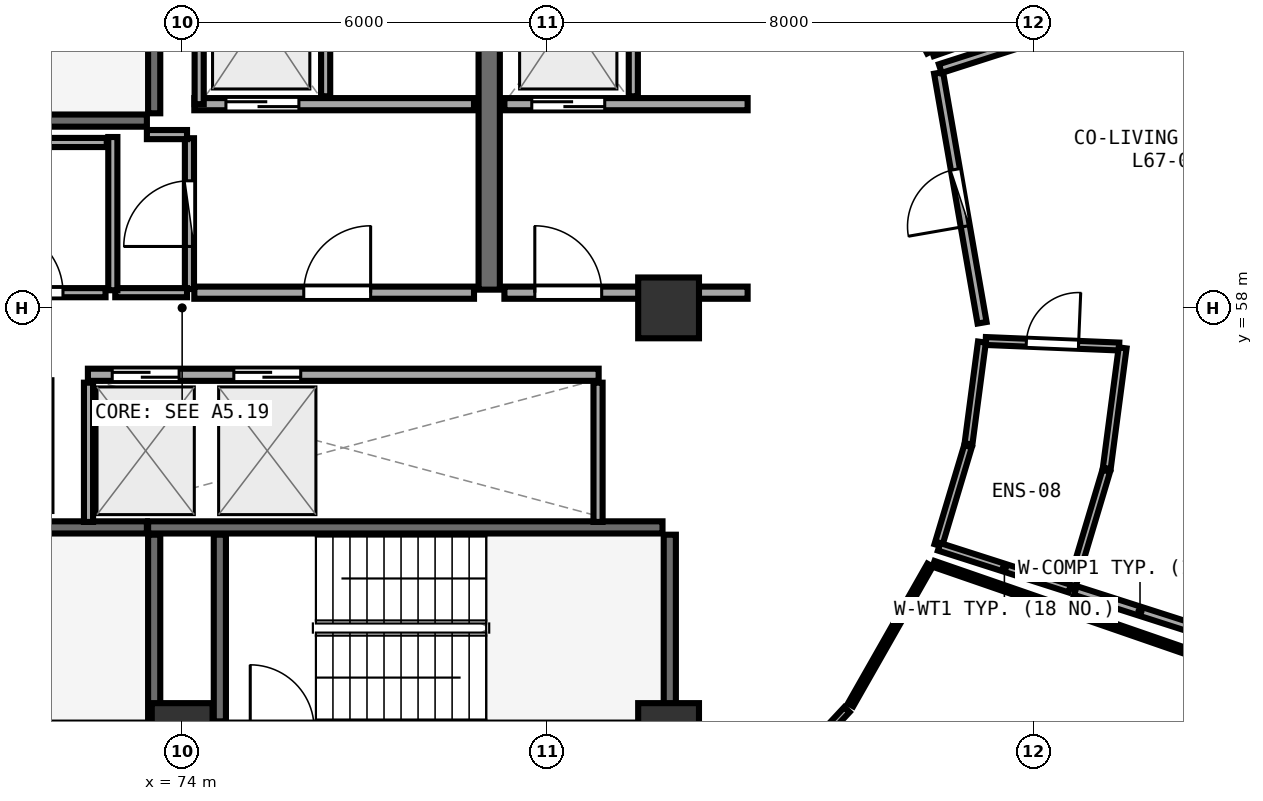
"""IFC4 building model, lengths in metres.
Left out: names, types, materials, properties, quantities, classifications, styles, units other than length and angle.
Written with IfcOpenShell. Run it as: python <this file> out.ifc"""

import sys

from ifc_helpers import new_model, si_unit, direction, frame, frame_2d, origin, origin_2d, place, context, subcontext, project, spatial, rectangle, extrude, element, fill, save


model = new_model("IFC4")
c1 = context("Model", 3, precision=1e-05, world=origin(), true_north=direction((0.0, 1.0)))
c2 = subcontext(c1, "Body", "Model", "MODEL_VIEW")
j1 = project(units=[si_unit("LENGTHUNIT", "METRE"), si_unit("PLANEANGLEUNIT", "RADIAN")], contexts=[c1])
p1 = place(None, origin())
s1 = spatial("IfcSite", under=j1, at=p1, CompositionType="ELEMENT")
p2 = place(p1, origin())
s2 = spatial("IfcBuilding", under=s1, at=p2, CompositionType="ELEMENT")
p3 = place(p2, frame((0.0, 0.0, 263.7)))
s3 = spatial("IfcBuildingStorey", under=s2, at=p3, CompositionType="ELEMENT", Elevation=263.7)
for number, where, z_axis, x_axis in (
    (1, (74.0, 51.0, 0.0), (0.0, 0.0, 1.0), (1.0, 0.0, 0.0)),
    (2, (82.0, 51.0, 0.0), (0.0, 0.0, 1.0), (1.0, 0.0, 0.0)),
    (3, (82.0, 58.0, 0.0), (0.0, 0.0, 1.0), (1.0, 0.0, 0.0)),
):
    element("IfcColumn", number, at=place(p3, frame(where, z_axis=z_axis, x_axis=x_axis)), inside=s3, PredefinedType="PILASTER", context=c2, shape_type="SweptSolid", body=[
        extrude(rectangle(XDim=1.0, YDim=1.0, at=origin_2d()), origin(), (0.0, 0.0, 1.0), 3.75),
    ])
p4 = place(p3, frame((66.26, 61.08, 0.0), z_axis=(0.0, 0.0, 1.0), x_axis=(1.0, 0.0, 0.0)))
e4 = element("IfcWall", 4, at=p4, inside=s3, PredefinedType="SHEAR", context=c2, shape_type="SweptSolid", body=[
    extrude(rectangle(XDim=7.16, YDim=0.2, at=frame_2d((3.58, 0.0))), origin(), (0.0, 0.0, 1.0), 3.49),
])
for number, where, z_axis, x_axis in (
    (5, (73.54, 61.2, 0.0), (0.0, 0.0, 1.0), (0.0, 1.0, 0.0)),
    (6, (82.02, 51.2, 0.0), (0.0, 0.0, 1.0), (0.0, 1.0, 0.0)),
):
    element("IfcWall", number, at=place(p3, frame(where, z_axis=z_axis, x_axis=x_axis)), inside=s3, PredefinedType="SHEAR", context=c2, shape_type="SweptSolid", body=[
        extrude(rectangle(XDim=3.07, YDim=0.2, at=frame_2d((1.535, 0.0))), origin(), (0.0, 0.0, 1.0), 3.49),
    ])
p5 = place(p3, frame((81.9, 54.39, 0.0), z_axis=(0.0, 0.0, 1.0), x_axis=(-1.0, 0.0, 0.0)))
e7 = element("IfcWall", 7, at=p5, inside=s3, PredefinedType="SHEAR", context=c2, shape_type="SweptSolid", body=[
    extrude(rectangle(XDim=8.46, YDim=0.2, at=frame_2d((4.23, 0.0))), origin(), (0.0, 0.0, 1.0), 3.49),
])
for number, where, z_axis, x_axis in (
    (8, (74.62, 54.27, 0.0), (0.0, 0.0, 1.0), (0.0, -1.0, 0.0)),
    (9, (73.54, 51.2, 0.0), (0.0, 0.0, 1.0), (0.0, 1.0, 0.0)),
):
    element("IfcWall", number, at=place(p3, frame(where, z_axis=z_axis, x_axis=x_axis)), inside=s3, PredefinedType="SHEAR", context=c2, shape_type="SweptSolid", body=[
        extrude(rectangle(XDim=3.07, YDim=0.2, at=frame_2d((1.535, 0.0))), origin(), (0.0, 0.0, 1.0), 3.49),
    ])
p6 = place(p3, frame((73.42, 54.39, 0.0), z_axis=(0.0, 0.0, 1.0), x_axis=(-1.0, 0.0, 0.0)))
e10 = element("IfcWall", 10, at=p6, inside=s3, PredefinedType="SHEAR", context=c2, shape_type="SweptSolid", body=[
    extrude(rectangle(XDim=7.16, YDim=0.2, at=frame_2d((3.58, 0.0))), origin(), (0.0, 0.0, 1.0), 3.49),
])
p7 = place(p3, frame((79.05, 58.3, 0.0), z_axis=(0.0, 0.0, 1.0), x_axis=(0.0, 1.0, 0.0)))
e11 = element("IfcWall", 11, at=p7, inside=s3, PredefinedType="SHEAR", context=c2, shape_type="SweptSolid", body=[
    extrude(rectangle(XDim=6.3, YDim=0.35, at=frame_2d((3.15, 0.0))), origin(), (0.0, 0.0, 1.0), 3.49),
])
p8 = place(p3, frame((74.2, 61.35, 0.0), z_axis=(0.0, 0.0, 1.0), x_axis=(1.0, 0.0, 0.0)))
e12 = element("IfcWall", 12, at=p8, inside=s3, PredefinedType="SOLIDWALL", context=c2, shape_type="SweptSolid", body=[
    extrude(rectangle(XDim=4.6, YDim=0.2, at=frame_2d((2.3, 0.0))), origin(), (0.0, 0.0, 1.0), 3.48),
])
p9 = place(p8, frame((0.52, 0.0, 0.0)))
e13 = element("IfcOpeningElement", 13, at=p9, cuts=e12, PredefinedType="OPENING", context=c2, shape_type="SweptSolid", body=[
    extrude(rectangle(XDim=1.2, YDim=2.15, at=frame_2d((0.6, 1.075))), frame((0.0, 0.11, 0.0), z_axis=(0.0, -1.0, 0.0), x_axis=(1.0, 0.0, 0.0)), (0.0, 0.0, 1.0), 0.22),
])
p10 = place(p3, frame((74.28, 61.35, 0.0), z_axis=(0.0, 0.0, 1.0), x_axis=(0.0, 1.0, 0.0)))
e14 = element("IfcWall", 14, at=p10, inside=s3, PredefinedType="PARTITIONING", context=c2, shape_type="SweptSolid", body=[
    extrude(rectangle(XDim=2.97, YDim=0.15, at=frame_2d((1.485, 0.0))), origin(), (0.0, 0.0, 1.0), 3.48),
])
p11 = place(p3, frame((76.36, 61.48, 0.0), z_axis=(0.0, 0.0, 1.0), x_axis=(0.0, 1.0, 0.0)))
e15 = element("IfcWall", 15, at=p11, inside=s3, PredefinedType="PARTITIONING", context=c2, shape_type="SweptSolid", body=[
    extrude(rectangle(XDim=2.84, YDim=0.15, at=frame_2d((1.42, 0.0))), origin(), (0.0, 0.0, 1.0), 3.48),
])
p12 = place(p3, frame((79.3, 61.35, 0.0), z_axis=(0.0, 0.0, 1.0), x_axis=(1.0, 0.0, 0.0)))
e16 = element("IfcWall", 16, at=p12, inside=s3, PredefinedType="SOLIDWALL", context=c2, shape_type="SweptSolid", body=[
    extrude(rectangle(XDim=4.0, YDim=0.2, at=frame_2d((2.0, 0.0))), origin(), (0.0, 0.0, 1.0), 2.775),
])
p13 = place(p12, frame((0.45, 0.0, 0.0)))
e17 = element("IfcOpeningElement", 17, at=p13, cuts=e16, PredefinedType="OPENING", context=c2, shape_type="SweptSolid", body=[
    extrude(rectangle(XDim=1.2, YDim=2.15, at=frame_2d((0.6, 1.075))), frame((0.0, 0.11, 0.0), z_axis=(0.0, -1.0, 0.0), x_axis=(1.0, 0.0, 0.0)), (0.0, 0.0, 1.0), 0.22),
])
p14 = place(p3, frame((81.42, 61.48, 0.0), z_axis=(0.0, 0.0, 1.0), x_axis=(0.0, 1.0, 0.0)))
e18 = element("IfcWall", 18, at=p14, inside=s3, PredefinedType="PARTITIONING", context=c2, shape_type="SweptSolid", body=[
    extrude(rectangle(XDim=2.84, YDim=0.15, at=frame_2d((1.42, 0.0))), origin(), (0.0, 0.0, 1.0), 3.48),
])
p15 = place(p3, frame((74.2, 58.25, 0.0), z_axis=(0.0, 0.0, 1.0), x_axis=(1.0, 0.0, 0.0)))
e19 = element("IfcWall", 19, at=p15, inside=s3, PredefinedType="SOLIDWALL", context=c2, shape_type="SweptSolid", body=[
    extrude(rectangle(XDim=4.6, YDim=0.2, at=frame_2d((2.3, 0.0))), origin(), (0.0, 0.0, 1.0), 3.48),
])
p16 = place(p15, frame((1.8, 0.0, 0.0)))
e20 = element("IfcOpeningElement", 20, at=p16, cuts=e19, PredefinedType="OPENING", context=c2, shape_type="SweptSolid", body=[
    extrude(rectangle(XDim=1.1, YDim=2.1, at=frame_2d((0.55, 1.05))), frame((0.0, 0.11, 0.0), z_axis=(0.0, -1.0, 0.0), x_axis=(1.0, 0.0, 0.0)), (0.0, 0.0, 1.0), 0.22),
])
p17 = place(p3, frame((79.3, 58.25, 0.0), z_axis=(0.0, 0.0, 1.0), x_axis=(1.0, 0.0, 0.0)))
e21 = element("IfcWall", 21, at=p17, inside=s3, PredefinedType="SOLIDWALL", context=c2, shape_type="SweptSolid", body=[
    extrude(rectangle(XDim=4.0, YDim=0.2, at=frame_2d((2.0, 0.0))), origin(), (0.0, 0.0, 1.0), 2.775),
])
p18 = place(p17, frame((0.5, 0.0, 0.0)))
e22 = element("IfcOpeningElement", 22, at=p18, cuts=e21, PredefinedType="OPENING", context=c2, shape_type="SweptSolid", body=[
    extrude(rectangle(XDim=1.1, YDim=2.1, at=frame_2d((0.55, 1.05))), frame((0.0, 0.11, 0.0), z_axis=(0.0, -1.0, 0.0), x_axis=(1.0, 0.0, 0.0)), (0.0, 0.0, 1.0), 0.22),
])
p19 = place(p3, frame((72.45, 56.9, 0.0), z_axis=(0.0, 0.0, 1.0), x_axis=(1.0, 0.0, 0.0)))
e23 = element("IfcWall", 23, at=p19, inside=s3, PredefinedType="SOLIDWALL", context=c2, shape_type="SweptSolid", body=[
    extrude(rectangle(XDim=8.4, YDim=0.2, at=frame_2d((4.2, 0.0))), origin(), (0.0, 0.0, 1.0), 3.48),
])
p20 = place(p19, frame((0.4, 0.0, 0.0)))
e24 = element("IfcOpeningElement", 24, at=p20, cuts=e23, PredefinedType="OPENING", context=c2, shape_type="SweptSolid", body=[
    extrude(rectangle(XDim=1.1, YDim=2.1, at=frame_2d((0.55, 1.05))), frame((0.0, 0.11, 0.0), z_axis=(0.0, -1.0, 0.0), x_axis=(1.0, 0.0, 0.0)), (0.0, 0.0, 1.0), 0.22),
])
p21 = place(p19, frame((2.4, 0.0, 0.0)))
e25 = element("IfcOpeningElement", 25, at=p21, cuts=e23, PredefinedType="OPENING", context=c2, shape_type="SweptSolid", body=[
    extrude(rectangle(XDim=1.1, YDim=2.1, at=frame_2d((0.55, 1.05))), frame((0.0, 0.11, 0.0), z_axis=(0.0, -1.0, 0.0), x_axis=(1.0, 0.0, 0.0)), (0.0, 0.0, 1.0), 0.22),
])
for number, where, z_axis, x_axis in (
    (26, (72.46, 54.48, 0.0), (0.0, 0.0, 1.0), (0.0, 1.0, 0.0)),
    (27, (80.84, 54.48, 0.0), (0.0, 0.0, 1.0), (0.0, 1.0, 0.0)),
):
    element("IfcWall", number, at=place(p3, frame(where, z_axis=z_axis, x_axis=x_axis)), inside=s3, PredefinedType="PARTITIONING", context=c2, shape_type="SweptSolid", body=[
        extrude(rectangle(XDim=2.29, YDim=0.15, at=frame_2d((1.145, 0.0))), origin(), (0.0, 0.0, 1.0), 3.48),
    ])
p22 = place(p3, frame((74.12, 58.31, 0.0), z_axis=(0.0, 0.0, 1.0), x_axis=(0.0, 1.0, 0.0)))
e28 = element("IfcWall", 28, at=p22, inside=s3, PredefinedType="PARTITIONING", context=c2, shape_type="SweptSolid", body=[
    extrude(rectangle(XDim=2.48, YDim=0.15, at=frame_2d((1.24, 0.0))), origin(), (0.0, 0.0, 1.0), 3.48),
])
p23 = place(p22, frame((0.7, 0.0, 0.0)))
e29 = element("IfcOpeningElement", 29, at=p23, cuts=e28, PredefinedType="OPENING", context=c2, shape_type="SweptSolid", body=[
    extrude(rectangle(XDim=1.08, YDim=2.1, at=frame_2d((0.54, 1.05))), frame((0.0, 0.085, 0.0), z_axis=(0.0, -1.0, 0.0), x_axis=(1.0, 0.0, 0.0)), (0.0, 0.0, 1.0), 0.17),
])
p24 = place(p3, frame((70.26, 58.25, 0.0), z_axis=(0.0, 0.0, 1.0), x_axis=(1.0, 0.0, 0.0)))
e30 = element("IfcWall", 30, at=p24, inside=s3, PredefinedType="PARTITIONING", context=c2, shape_type="SweptSolid", body=[
    extrude(rectangle(XDim=2.48, YDim=0.15, at=frame_2d((1.24, 0.0))), origin(), (0.0, 0.0, 1.0), 3.48),
])
p25 = place(p24, frame((0.7, 0.0, 0.0)))
e31 = element("IfcOpeningElement", 31, at=p25, cuts=e30, PredefinedType="OPENING", context=c2, shape_type="SweptSolid", body=[
    extrude(rectangle(XDim=1.08, YDim=2.1, at=frame_2d((0.54, 1.05))), frame((0.0, 0.085, 0.0), z_axis=(0.0, -1.0, 0.0), x_axis=(1.0, 0.0, 0.0)), (0.0, 0.0, 1.0), 0.17),
])
p26 = place(p3, frame((83.118, 49.443, 0.0), z_axis=(0.0, 0.0, 1.0), x_axis=(0.681315269885, 0.731990097625, 0.0)))
e32 = element("IfcWall", 32, at=p26, inside=s3, PredefinedType="PARTITIONING", context=c2, shape_type="SweptSolid", body=[
    extrude(rectangle(XDim=2.664, YDim=0.12, at=frame_2d((1.332, 0.0))), origin(), (0.0, 0.0, 1.0), 3.075),
])
p27 = place(p26, frame((0.882, 0.0, 0.0)))
e33 = element("IfcOpeningElement", 33, at=p27, cuts=e32, PredefinedType="OPENING", context=c2, shape_type="SweptSolid", body=[
    extrude(rectangle(XDim=0.9, YDim=2.08, at=frame_2d((0.45, 1.04))), frame((0.0, 0.07, 0.0), z_axis=(0.0, -1.0, 0.0), x_axis=(1.0, 0.0, 0.0)), (0.0, 0.0, 1.0), 0.14),
])
p28 = place(p3, frame((87.216, 57.456, 0.0), z_axis=(0.0, 0.0, 1.0), x_axis=(0.999139994921, -0.041464087462, 0.0)))
e34 = element("IfcWall", 34, at=p28, inside=s3, PredefinedType="PLUMBINGWALL", context=c2, shape_type="SweptSolid", body=[
    extrude(rectangle(XDim=2.196, YDim=0.13, at=frame_2d((1.098, 0.0))), origin(), (0.0, 0.0, 1.0), 3.175),
])
p29 = place(p28, frame((0.668, 0.0, 0.0)))
e35 = element("IfcOpeningElement", 35, at=p29, cuts=e34, PredefinedType="OPENING", context=c2, shape_type="SweptSolid", body=[
    extrude(rectangle(XDim=0.86, YDim=2.05, at=frame_2d((0.43, 1.025))), frame((0.0, 0.075, 0.0), z_axis=(0.0, -1.0, 0.0), x_axis=(1.0, 0.0, 0.0)), (0.0, 0.0, 1.0), 0.15),
])
p30 = place(p3, frame((87.156, 57.755, 0.0), z_axis=(0.0, 0.0, 1.0), x_axis=(-0.171570913007, 0.985171772743, 0.0)))
e36 = element("IfcWall", 36, at=p30, inside=s3, PredefinedType="PARTITIONING", context=c2, shape_type="SweptSolid", body=[
    extrude(rectangle(XDim=4.171, YDim=0.15, at=frame_2d((2.085, 0.0))), origin(), (0.0, 0.0, 1.0), 3.075),
])
p31 = place(p30, frame((1.61, 0.0, 0.0)))
e37 = element("IfcOpeningElement", 37, at=p31, cuts=e36, PredefinedType="OPENING", context=c2, shape_type="SweptSolid", body=[
    extrude(rectangle(XDim=0.95, YDim=2.08, at=frame_2d((0.475, 1.04))), frame((0.0, 0.085, 0.0), z_axis=(0.0, -1.0, 0.0), x_axis=(1.0, 0.0, 0.0)), (0.0, 0.0, 1.0), 0.17),
])
p32 = place(p3, frame((72.9, 58.25, 0.0), z_axis=(0.0, 0.0, 1.0), x_axis=(1.0, 0.0, 0.0)))
e38 = element("IfcWall", 38, at=p32, inside=s3, PredefinedType="PARTITIONING", context=c2, shape_type="SweptSolid", body=[
    extrude(rectangle(XDim=1.18, YDim=0.15, at=frame_2d((0.59, 0.0))), origin(), (0.0, 0.0, 1.0), 3.48),
])
p33 = place(p3, frame((74.08, 60.85, 0.0), z_axis=(0.0, 0.0, 1.0), x_axis=(-1.0, 0.0, 0.0)))
e39 = element("IfcWall", 39, at=p33, inside=s3, PredefinedType="PARTITIONING", context=c2, shape_type="SweptSolid", body=[
    extrude(rectangle(XDim=0.66, YDim=0.15, at=frame_2d((0.33, 0.0))), origin(), (0.0, 0.0, 1.0), 3.48),
])
for number, where, z_axis, x_axis in (
    (40, (72.86, 60.81, 0.0), (0.0, 0.0, 1.0), (0.0, -1.0, 0.0)),
    (41, (72.76, 60.72, 0.0), (0.0, 0.0, 1.0), (-1.0, 0.0, 0.0)),
):
    element("IfcWall", number, at=place(p3, frame(where, z_axis=z_axis, x_axis=x_axis)), inside=s3, PredefinedType="PARTITIONING", context=c2, shape_type="SweptSolid", body=[
        extrude(rectangle(XDim=2.52, YDim=0.15, at=frame_2d((1.26, 0.0))), origin(), (0.0, 0.0, 1.0), 3.48),
    ])
p34 = place(p3, frame((86.311, 62.214, 0.0), z_axis=(0.0, 0.0, 1.0), x_axis=(-0.457623641393, 0.889145996357, 0.0)))
e42 = element("IfcWall", 42, at=p34, inside=s3, PredefinedType="PLUMBINGWALL", context=c2, shape_type="SweptSolid", body=[
    extrude(rectangle(XDim=1.721, YDim=0.13, at=frame_2d((0.86, 0.0))), origin(), (0.0, 0.0, 1.0), 3.235),
])
p35 = place(p3, frame((88.467, 62.938, 0.0), z_axis=(0.0, 0.0, 1.0), x_axis=(-0.94520115701, -0.326488549244, 0.0)))
e43 = element("IfcWall", 43, at=p35, inside=s3, PredefinedType="PLUMBINGWALL", context=c2, shape_type="SweptSolid", body=[
    extrude(rectangle(XDim=2.251, YDim=0.13, at=frame_2d((1.126, 0.0))), origin(), (0.0, 0.0, 1.0), 3.175),
])
p36 = place(p3, frame((84.994, 51.472, 0.0), z_axis=(0.0, 0.0, 1.0), x_axis=(0.494277588427, 0.869304127207, 0.0)))
e44 = element("IfcWall", 44, at=p36, inside=s3, PredefinedType="PARTITIONING", context=c2, shape_type="SweptSolid", body=[
    extrude(rectangle(XDim=2.643, YDim=0.1, at=frame_2d((1.322, 0.0))), origin(), (0.0, 0.0, 1.0), 3.075),
])
p37 = place(p3, frame((86.358, 53.791, 0.0), z_axis=(0.0, 0.0, 1.0), x_axis=(0.945103281494, -0.326771766388, 0.0)))
e45 = element("IfcWall", 45, at=p37, inside=s3, PredefinedType="PARTITIONING", context=c2, shape_type="SweptSolid", body=[
    extrude(rectangle(XDim=4.604, YDim=0.1, at=frame_2d((2.302, 0.0))), origin(), (0.0, 0.0, 1.0), 3.075),
])
p38 = place(p3, frame((86.436, 54.096, 0.0), z_axis=(0.0, 0.0, 1.0), x_axis=(0.287308367232, 0.957838139833, 0.0)))
e46 = element("IfcWall", 46, at=p38, inside=s3, PredefinedType="PLUMBINGWALL", context=c2, shape_type="SweptSolid", body=[
    extrude(rectangle(XDim=1.7, YDim=0.13, at=frame_2d((0.85, 0.0))), origin(), (0.0, 0.0, 1.0), 3.48),
])
p39 = place(p3, frame((86.933, 55.764, 0.0), z_axis=(0.0, 0.0, 1.0), x_axis=(0.130686363399, 0.991423761275, 0.0)))
e47 = element("IfcWall", 47, at=p39, inside=s3, PredefinedType="PLUMBINGWALL", context=c2, shape_type="SweptSolid", body=[
    extrude(rectangle(XDim=1.689, YDim=0.13, at=frame_2d((0.844, 0.0))), origin(), (0.0, 0.0, 1.0), 3.48),
])
p40 = place(p3, frame((89.467, 57.342, 0.0), z_axis=(0.0, 0.0, 1.0), x_axis=(-0.130467152696, -0.991452632286, 0.0)))
e48 = element("IfcWall", 48, at=p40, inside=s3, PredefinedType="PLUMBINGWALL", context=c2, shape_type="SweptSolid", body=[
    extrude(rectangle(XDim=1.999, YDim=0.13, at=frame_2d((0.999, 0.0))), origin(), (0.0, 0.0, 1.0), 3.48),
])
p41 = place(p3, frame((89.198, 55.322, 0.0), z_axis=(0.0, 0.0, 1.0), x_axis=(-0.286890981069, -0.957963237803, 0.0)))
e49 = element("IfcWall", 49, at=p41, inside=s3, PredefinedType="PLUMBINGWALL", context=c2, shape_type="SweptSolid", body=[
    extrude(rectangle(XDim=2.01, YDim=0.13, at=frame_2d((1.005, 0.0))), origin(), (0.0, 0.0, 1.0), 3.48),
])
p42 = place(p3, frame((88.597, 53.383, 0.0), z_axis=(0.0, 0.0, 1.0), x_axis=(-0.952372601519, 0.304936760454, 0.0)))
e50 = element("IfcWall", 50, at=p42, inside=s3, PredefinedType="PLUMBINGWALL", context=c2, shape_type="SweptSolid", body=[
    extrude(rectangle(XDim=2.255, YDim=0.13, at=frame_2d((1.128, 0.0))), origin(), (0.0, 0.0, 1.0), 3.175),
])
p43 = place(p3, frame((86.468, 61.935, 0.0), z_axis=(0.0, 0.0, 1.0), x_axis=(0.95227750557, 0.305233602976, 0.0)))
e51 = element("IfcWall", 51, at=p43, inside=s3, PredefinedType="PARTITIONING", context=c2, shape_type="SweptSolid", body=[
    extrude(rectangle(XDim=4.565, YDim=0.15, at=frame_2d((2.283, 0.0))), origin(), (0.0, 0.0, 1.0), 3.175),
])
p44 = place(p3, frame((90.816, 52.671, 0.0), z_axis=(0.0, 0.0, 1.0), x_axis=(-0.952285550261, 0.305208503755, 0.0)))
e52 = element("IfcWall", 52, at=p44, inside=s3, PredefinedType="PARTITIONING", context=c2, shape_type="SweptSolid", body=[
    extrude(rectangle(XDim=2.231, YDim=0.15, at=frame_2d((1.115, 0.0))), origin(), (0.0, 0.0, 1.0), 3.235),
])
p45 = place(p9, origin())
e53 = element("IfcDoor", 53, at=p45, inside=s3, OperationType="DOUBLE_DOOR_SLIDING", PredefinedType="DOOR", context=c2, shape_type="SweptSolid", body=[
    extrude(rectangle(XDim=1.2, YDim=2.15, at=frame_2d((0.6, 1.075))), frame((0.0, 0.025, 0.0), z_axis=(0.0, -1.0, 0.0), x_axis=(1.0, 0.0, 0.0)), (0.0, 0.0, 1.0), 0.05),
])
fill(e13, e53)
p46 = place(p13, origin())
e54 = element("IfcDoor", 54, at=p46, inside=s3, OperationType="DOUBLE_DOOR_SLIDING", PredefinedType="DOOR", context=c2, shape_type="SweptSolid", body=[
    extrude(rectangle(XDim=1.2, YDim=2.15, at=frame_2d((0.6, 1.075))), frame((0.0, 0.025, 0.0), z_axis=(0.0, -1.0, 0.0), x_axis=(1.0, 0.0, 0.0)), (0.0, 0.0, 1.0), 0.05),
])
fill(e17, e54)
p47 = place(p16, frame((1.1, 0.0, 0.0), z_axis=(0.0, 0.0, 1.0), x_axis=(-1.0, 0.0, 0.0)))
e55 = element("IfcDoor", 55, at=p47, inside=s3, OperationType="SINGLE_SWING_LEFT", PredefinedType="DOOR", context=c2, shape_type="SweptSolid", body=[
    extrude(rectangle(XDim=1.1, YDim=2.1, at=frame_2d((0.55, 1.05))), frame((0.0, 0.025, 0.0), z_axis=(0.0, -1.0, 0.0), x_axis=(1.0, 0.0, 0.0)), (0.0, 0.0, 1.0), 0.05),
])
fill(e20, e55)
p48 = place(p18, frame((1.1, 0.0, 0.0), z_axis=(0.0, 0.0, 1.0), x_axis=(-1.0, 0.0, 0.0)))
e56 = element("IfcDoor", 56, at=p48, inside=s3, OperationType="SINGLE_SWING_RIGHT", PredefinedType="DOOR", context=c2, shape_type="SweptSolid", body=[
    extrude(rectangle(XDim=1.1, YDim=2.1, at=frame_2d((0.55, 1.05))), frame((0.0, 0.025, 0.0), z_axis=(0.0, -1.0, 0.0), x_axis=(1.0, 0.0, 0.0)), (0.0, 0.0, 1.0), 0.05),
])
fill(e22, e56)
p49 = place(p20, origin())
e57 = element("IfcDoor", 57, at=p49, inside=s3, OperationType="DOUBLE_DOOR_SLIDING", PredefinedType="DOOR", context=c2, shape_type="SweptSolid", body=[
    extrude(rectangle(XDim=1.1, YDim=2.1, at=frame_2d((0.55, 1.05))), frame((0.0, 0.025, 0.0), z_axis=(0.0, -1.0, 0.0), x_axis=(1.0, 0.0, 0.0)), (0.0, 0.0, 1.0), 0.05),
])
fill(e24, e57)
p50 = place(p21, origin())
e58 = element("IfcDoor", 58, at=p50, inside=s3, OperationType="DOUBLE_DOOR_SLIDING", PredefinedType="DOOR", context=c2, shape_type="SweptSolid", body=[
    extrude(rectangle(XDim=1.1, YDim=2.1, at=frame_2d((0.55, 1.05))), frame((0.0, 0.025, 0.0), z_axis=(0.0, -1.0, 0.0), x_axis=(1.0, 0.0, 0.0)), (0.0, 0.0, 1.0), 0.05),
])
fill(e25, e58)
p51 = place(p23, origin())
e59 = element("IfcDoor", 59, at=p51, inside=s3, OperationType="SINGLE_SWING_LEFT", PredefinedType="DOOR", context=c2, shape_type="SweptSolid", body=[
    extrude(rectangle(XDim=1.08, YDim=2.1, at=frame_2d((0.54, 1.05))), frame((0.0, 0.025, 0.0), z_axis=(0.0, -1.0, 0.0), x_axis=(1.0, 0.0, 0.0)), (0.0, 0.0, 1.0), 0.05),
])
fill(e29, e59)
p52 = place(p25, origin())
e60 = element("IfcDoor", 60, at=p52, inside=s3, OperationType="SINGLE_SWING_LEFT", PredefinedType="DOOR", context=c2, shape_type="SweptSolid", body=[
    extrude(rectangle(XDim=1.08, YDim=2.1, at=frame_2d((0.54, 1.05))), frame((0.0, 0.025, 0.0), z_axis=(0.0, -1.0, 0.0), x_axis=(1.0, 0.0, 0.0)), (0.0, 0.0, 1.0), 0.05),
])
fill(e31, e60)
p53 = place(p29, origin())
e61 = element("IfcDoor", 61, at=p53, inside=s3, OperationType="SINGLE_SWING_RIGHT", PredefinedType="DOOR", context=c2, shape_type="SweptSolid", body=[
    extrude(rectangle(XDim=0.86, YDim=2.05, at=frame_2d((0.43, 1.025))), frame((0.0, 0.025, 0.0), z_axis=(0.0, -1.0, 0.0), x_axis=(1.0, 0.0, 0.0)), (0.0, 0.0, 1.0), 0.05),
])
fill(e35, e61)
p54 = place(p31, origin())
e62 = element("IfcDoor", 62, at=p54, inside=s3, OperationType="SINGLE_SWING_LEFT", PredefinedType="DOOR", context=c2, shape_type="SweptSolid", body=[
    extrude(rectangle(XDim=0.95, YDim=2.08, at=frame_2d((0.475, 1.04))), frame((0.0, 0.025, 0.0), z_axis=(0.0, -1.0, 0.0), x_axis=(1.0, 0.0, 0.0)), (0.0, 0.0, 1.0), 0.05),
])
fill(e37, e62)
save(model, sys.argv[1])
